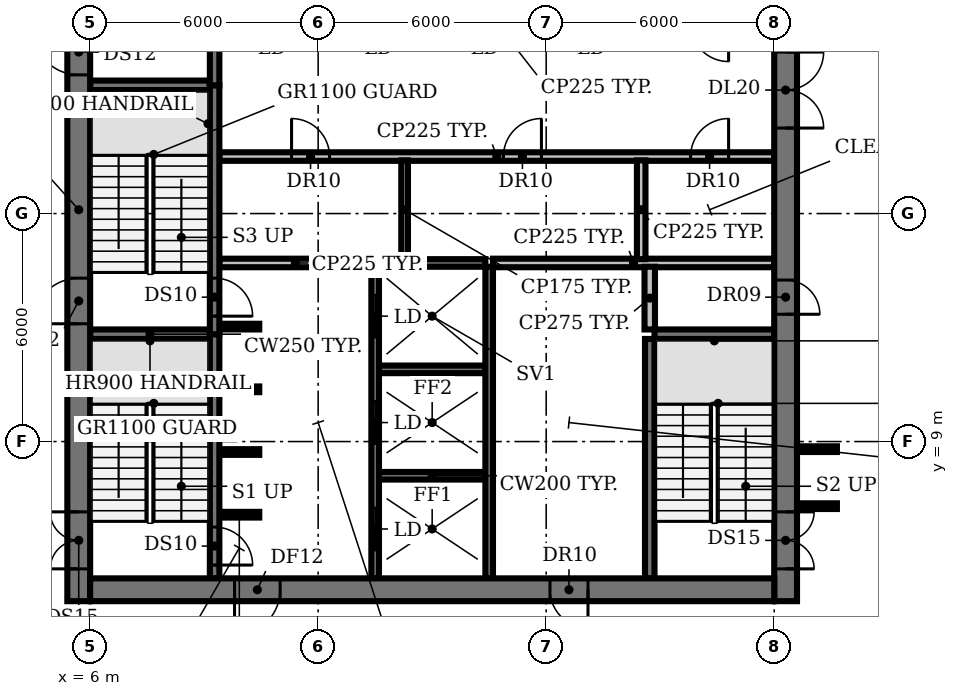
"""IFC4 building model, lengths in metres.
Left out: names, types, materials, properties, quantities, classifications, styles, units other than length and angle.
Written with IfcOpenShell. Run it as: python <this file> out.ifc"""

import sys

from ifc_helpers import new_model, si_unit, direction, frame, frame_2d, origin, place, context, subcontext, project, spatial, rectangle, extrude, element, fill, save


model = new_model("IFC4")
c1 = context("Model", 3, precision=1e-05, world=origin(), true_north=direction((0.0, 1.0)))
c2 = subcontext(c1, "Body", "Model", "MODEL_VIEW")
j1 = project(units=[si_unit("LENGTHUNIT", "METRE"), si_unit("PLANEANGLEUNIT", "RADIAN")], contexts=[c1])
p1 = place(None, origin())
s1 = spatial("IfcSite", under=j1, at=p1, CompositionType="ELEMENT")
p2 = place(p1, origin())
s2 = spatial("IfcBuilding", under=s1, at=p2, CompositionType="ELEMENT")
p3 = place(p2, frame((0.0, 0.0, 184.4)))
s3 = spatial("IfcBuildingStorey", under=s2, at=p3, CompositionType="ELEMENT", Elevation=184.4)
p4 = place(p3, frame((9.4, 7.075, 0.0), z_axis=(0.0, 0.0, 1.0), x_axis=(1.0, 0.0, 0.0)))
e1 = element("IfcWall", 1, at=p4, inside=s3, PredefinedType="SHEAR", context=c2, shape_type="SweptSolid", body=[
    extrude(rectangle(XDim=1.05, YDim=0.15, at=frame_2d((0.525, 0.0))), origin(), (0.0, 0.0, 1.0), 3.85),
])
p5 = place(p3, frame((13.6, 8.1, 0.0), z_axis=(0.0, 0.0, 1.0), x_axis=(1.0, 0.0, 0.0)))
e2 = element("IfcWall", 2, at=p5, inside=s3, PredefinedType="SHEAR", context=c2, shape_type="SweptSolid", body=[
    extrude(rectangle(XDim=2.8, YDim=0.2, at=frame_2d((1.4, 0.0))), origin(), (0.0, 0.0, 1.0), 3.85),
])
for number, where, z_axis, x_axis in (
    (3, (9.4, 8.725, 0.0), (0.0, 0.0, 1.0), (1.0, 0.0, 0.0)),
    (4, (9.4, 10.375, 0.0), (0.0, 0.0, 1.0), (1.0, 0.0, 0.0)),
):
    element("IfcWall", number, at=place(p3, frame(where, z_axis=z_axis, x_axis=x_axis)), inside=s3, PredefinedType="SHEAR", context=c2, shape_type="SweptSolid", body=[
        extrude(rectangle(XDim=1.05, YDim=0.15, at=frame_2d((0.525, 0.0))), origin(), (0.0, 0.0, 1.0), 3.85),
    ])
p6 = place(p3, frame((13.6, 10.9, 0.0), z_axis=(0.0, 0.0, 1.0), x_axis=(1.0, 0.0, 0.0)))
e5 = element("IfcWall", 5, at=p6, inside=s3, PredefinedType="SHEAR", context=c2, shape_type="SweptSolid", body=[
    extrude(rectangle(XDim=2.8, YDim=0.2, at=frame_2d((1.4, 0.0))), origin(), (0.0, 0.0, 1.0), 3.85),
])
for number, where, z_axis, x_axis in (
    (6, (6.0, 11.825, 0.0), (0.0, 0.0, 1.0), (1.0, 0.0, 0.0)),
    (7, (20.85, 11.825, 0.0), (0.0, 0.0, 1.0), (1.0, 0.0, 0.0)),
):
    element("IfcWall", number, at=place(p3, frame(where, z_axis=z_axis, x_axis=x_axis)), inside=s3, PredefinedType="SHEAR", context=c2, shape_type="SweptSolid", body=[
        extrude(rectangle(XDim=3.15, YDim=0.25, at=frame_2d((1.575, 0.0))), origin(), (0.0, 0.0, 1.0), 3.85),
    ])
p7 = place(p3, frame((9.4, 12.025, 0.0), z_axis=(0.0, 0.0, 1.0), x_axis=(1.0, 0.0, 0.0)))
e8 = element("IfcWall", 8, at=p7, inside=s3, PredefinedType="SHEAR", context=c2, shape_type="SweptSolid", body=[
    extrude(rectangle(XDim=1.05, YDim=0.15, at=frame_2d((0.525, 0.0))), origin(), (0.0, 0.0, 1.0), 3.85),
])
p8 = place(p3, frame((9.4, 13.7, 0.0), z_axis=(0.0, 0.0, 1.0), x_axis=(1.0, 0.0, 0.0)))
e9 = element("IfcWall", 9, at=p8, inside=s3, PredefinedType="PARTITIONING", context=c2, shape_type="SweptSolid", body=[
    extrude(rectangle(XDim=4.0, YDim=0.225, at=frame_2d((2.0, 0.0))), origin(), (0.0, 0.0, 1.0), 3.85),
])
p9 = place(p3, frame((13.6, 13.7, 0.0), z_axis=(0.0, 0.0, 1.0), x_axis=(1.0, 0.0, 0.0)))
e10 = element("IfcWall", 10, at=p9, inside=s3, PredefinedType="SHEAR", context=c2, shape_type="SweptSolid", body=[
    extrude(rectangle(XDim=2.8, YDim=0.2, at=frame_2d((1.4, 0.0))), origin(), (0.0, 0.0, 1.0), 3.85),
])
p10 = place(p3, frame((16.6, 13.7, 0.0), z_axis=(0.0, 0.0, 1.0), x_axis=(1.0, 0.0, 0.0)))
e11 = element("IfcWall", 11, at=p10, inside=s3, PredefinedType="PARTITIONING", context=c2, shape_type="SweptSolid", body=[
    extrude(rectangle(XDim=7.4, YDim=0.225, at=frame_2d((3.7, 0.0))), origin(), (0.0, 0.0, 1.0), 3.85),
])
p11 = place(p3, frame((9.4, 16.5, 0.0), z_axis=(0.0, 0.0, 1.0), x_axis=(1.0, 0.0, 0.0)))
e12 = element("IfcWall", 12, at=p11, inside=s3, PredefinedType="PARTITIONING", context=c2, shape_type="SweptSolid", body=[
    extrude(rectangle(XDim=14.6, YDim=0.225, at=frame_2d((7.3, 0.0))), origin(), (0.0, 0.0, 1.0), 3.85),
])
p12 = place(p11, frame((1.9, 0.0, 0.0)))
e13 = element("IfcOpeningElement", 13, at=p12, cuts=e12, PredefinedType="OPENING", context=c2, shape_type="SweptSolid", body=[
    extrude(rectangle(XDim=1.0, YDim=2.1, at=frame_2d((0.5, 1.05))), frame((0.0, 0.123, 0.0), z_axis=(0.0, -1.0, 0.0), x_axis=(1.0, 0.0, 0.0)), (0.0, 0.0, 1.0), 0.245),
])
p13 = place(p11, frame((7.475, 0.0, 0.0)))
e14 = element("IfcOpeningElement", 14, at=p13, cuts=e12, PredefinedType="OPENING", context=c2, shape_type="SweptSolid", body=[
    extrude(rectangle(XDim=1.0, YDim=2.1, at=frame_2d((0.5, 1.05))), frame((0.0, 0.123, 0.0), z_axis=(0.0, -1.0, 0.0), x_axis=(1.0, 0.0, 0.0)), (0.0, 0.0, 1.0), 0.245),
])
p14 = place(p11, frame((12.4, 0.0, 0.0)))
e15 = element("IfcOpeningElement", 15, at=p14, cuts=e12, PredefinedType="OPENING", context=c2, shape_type="SweptSolid", body=[
    extrude(rectangle(XDim=1.0, YDim=2.1, at=frame_2d((0.5, 1.05))), frame((0.0, 0.123, 0.0), z_axis=(0.0, -1.0, 0.0), x_axis=(1.0, 0.0, 0.0)), (0.0, 0.0, 1.0), 0.245),
])
p15 = place(p3, frame((6.0, 18.375, 0.0), z_axis=(0.0, 0.0, 1.0), x_axis=(1.0, 0.0, 0.0)))
e16 = element("IfcWall", 16, at=p15, inside=s3, PredefinedType="SHEAR", context=c2, shape_type="SweptSolid", body=[
    extrude(rectangle(XDim=3.15, YDim=0.25, at=frame_2d((1.575, 0.0))), origin(), (0.0, 0.0, 1.0), 3.85),
])
p16 = place(p3, frame((9.275, 11.825, 0.0), z_axis=(0.0, 0.0, 1.0), x_axis=(0.0, -1.0, 0.0)))
e17 = element("IfcWall", 17, at=p16, inside=s3, PredefinedType="SHEAR", context=c2, shape_type="SweptSolid", body=[
    extrude(rectangle(XDim=6.425, YDim=0.25, at=frame_2d((3.212, 0.0))), origin(), (0.0, 0.0, 1.0), 3.85),
])
p17 = place(p16, frame((5.075, 0.0, 0.0)))
e18 = element("IfcOpeningElement", 18, at=p17, cuts=e17, PredefinedType="OPENING", context=c2, shape_type="SweptSolid", body=[
    extrude(rectangle(XDim=1.0, YDim=2.1, at=frame_2d((0.5, 1.05))), frame((0.0, 0.135, 0.0), z_axis=(0.0, -1.0, 0.0), x_axis=(1.0, 0.0, 0.0)), (0.0, 0.0, 1.0), 0.27),
])
p18 = place(p3, frame((9.275, 18.375, 0.0), z_axis=(0.0, 0.0, 1.0), x_axis=(0.0, -1.0, 0.0)))
e19 = element("IfcWall", 19, at=p18, inside=s3, PredefinedType="SHEAR", context=c2, shape_type="SweptSolid", body=[
    extrude(rectangle(XDim=6.55, YDim=0.25, at=frame_2d((3.275, 0.0))), origin(), (0.0, 0.0, 1.0), 3.85),
])
p19 = place(p18, frame((5.075, 0.0, 0.0)))
e20 = element("IfcOpeningElement", 20, at=p19, cuts=e19, PredefinedType="OPENING", context=c2, shape_type="SweptSolid", body=[
    extrude(rectangle(XDim=1.0, YDim=2.1, at=frame_2d((0.5, 1.05))), frame((0.0, 0.135, 0.0), z_axis=(0.0, -1.0, 0.0), x_axis=(1.0, 0.0, 0.0)), (0.0, 0.0, 1.0), 0.27),
])
p20 = place(p3, frame((9.275, 18.375, 0.0), z_axis=(0.0, 0.0, 1.0), x_axis=(0.0, 1.0, 0.0)))
e21 = element("IfcWall", 21, at=p20, inside=s3, PredefinedType="SHEAR", context=c2, shape_type="SweptSolid", body=[
    extrude(rectangle(XDim=6.425, YDim=0.25, at=frame_2d((3.212, 0.0))), origin(), (0.0, 0.0, 1.0), 3.85),
])
p21 = place(p3, frame((13.5, 5.4, 0.0), z_axis=(0.0, 0.0, 1.0), x_axis=(0.0, 1.0, 0.0)))
e22 = element("IfcWall", 22, at=p21, inside=s3, PredefinedType="SHEAR", context=c2, shape_type="SweptSolid", body=[
    extrude(rectangle(XDim=8.2, YDim=0.2, at=frame_2d((4.1, 0.0))), origin(), (0.0, 0.0, 1.0), 3.85),
])
p22 = place(p21, frame((0.75, 0.0, 0.0)))
e23 = element("IfcOpeningElement", 23, at=p22, cuts=e22, PredefinedType="OPENING", context=c2, shape_type="SweptSolid", body=[
    extrude(rectangle(XDim=1.1, YDim=2.1, at=frame_2d((0.55, 1.05))), frame((0.0, 0.11, 0.0), z_axis=(0.0, -1.0, 0.0), x_axis=(1.0, 0.0, 0.0)), (0.0, 0.0, 1.0), 0.22),
])
p23 = place(p21, frame((3.55, 0.0, 0.0)))
e24 = element("IfcOpeningElement", 24, at=p23, cuts=e22, PredefinedType="OPENING", context=c2, shape_type="SweptSolid", body=[
    extrude(rectangle(XDim=1.1, YDim=2.1, at=frame_2d((0.55, 1.05))), frame((0.0, 0.11, 0.0), z_axis=(0.0, -1.0, 0.0), x_axis=(1.0, 0.0, 0.0)), (0.0, 0.0, 1.0), 0.22),
])
p24 = place(p21, frame((6.35, 0.0, 0.0)))
e25 = element("IfcOpeningElement", 25, at=p24, cuts=e22, PredefinedType="OPENING", context=c2, shape_type="SweptSolid", body=[
    extrude(rectangle(XDim=1.1, YDim=2.1, at=frame_2d((0.55, 1.05))), frame((0.0, 0.11, 0.0), z_axis=(0.0, -1.0, 0.0), x_axis=(1.0, 0.0, 0.0)), (0.0, 0.0, 1.0), 0.22),
])
p25 = place(p3, frame((14.275, 13.8, 0.0), z_axis=(0.0, 0.0, 1.0), x_axis=(0.0, 1.0, 0.0)))
e26 = element("IfcWall", 26, at=p25, inside=s3, PredefinedType="PARTITIONING", context=c2, shape_type="SweptSolid", body=[
    extrude(rectangle(XDim=2.6, YDim=0.175, at=frame_2d((1.3, 0.0))), origin(), (0.0, 0.0, 1.0), 3.85),
])
p26 = place(p3, frame((16.5, 5.4, 0.0), z_axis=(0.0, 0.0, 1.0), x_axis=(0.0, 1.0, 0.0)))
e27 = element("IfcWall", 27, at=p26, inside=s3, PredefinedType="SHEAR", context=c2, shape_type="SweptSolid", body=[
    extrude(rectangle(XDim=8.2, YDim=0.2, at=frame_2d((4.1, 0.0))), origin(), (0.0, 0.0, 1.0), 3.85),
])
p27 = place(p3, frame((20.5, 13.8, 0.0), z_axis=(0.0, 0.0, 1.0), x_axis=(0.0, 1.0, 0.0)))
e28 = element("IfcWall", 28, at=p27, inside=s3, PredefinedType="PARTITIONING", context=c2, shape_type="SweptSolid", body=[
    extrude(rectangle(XDim=2.6, YDim=0.225, at=frame_2d((1.3, 0.0))), origin(), (0.0, 0.0, 1.0), 3.85),
])
p28 = place(p3, frame((20.725, 5.4, 0.0), z_axis=(0.0, 0.0, 1.0), x_axis=(0.0, 1.0, 0.0)))
e29 = element("IfcWall", 29, at=p28, inside=s3, PredefinedType="SHEAR", context=c2, shape_type="SweptSolid", body=[
    extrude(rectangle(XDim=6.3, YDim=0.25, at=frame_2d((3.15, 0.0))), origin(), (0.0, 0.0, 1.0), 3.85),
])
p29 = place(p3, frame((20.725, 11.95, 0.0), z_axis=(0.0, 0.0, 1.0), x_axis=(0.0, 1.0, 0.0)))
e30 = element("IfcWall", 30, at=p29, inside=s3, PredefinedType="PARTITIONING", context=c2, shape_type="SweptSolid", body=[
    extrude(rectangle(XDim=1.65, YDim=0.275, at=frame_2d((0.825, 0.0))), origin(), (0.0, 0.0, 1.0), 3.85),
])
p30 = place(p3, frame((5.7, 4.8, 0.0), z_axis=(0.0, 0.0, 1.0), x_axis=(0.0, 1.0, 0.0)))
e31 = element("IfcWall", 31, at=p30, inside=s3, PredefinedType="SHEAR", context=c2, shape_type="SweptSolid", body=[
    extrude(rectangle(XDim=20.6, YDim=0.6, at=frame_2d((10.3, 0.0))), origin(), (0.0, 0.0, 1.0), 3.85),
])
p31 = place(p30, frame((0.85, 0.0, 0.0)))
e32 = element("IfcOpeningElement", 32, at=p31, cuts=e31, PredefinedType="OPENING", context=c2, shape_type="SweptSolid", body=[
    extrude(rectangle(XDim=1.5, YDim=2.1, at=frame_2d((0.75, 1.05))), frame((0.0, 0.31, 0.0), z_axis=(0.0, -1.0, 0.0), x_axis=(1.0, 0.0, 0.0)), (0.0, 0.0, 1.0), 0.62),
])
p32 = place(p30, frame((7.3, 0.0, 0.0)))
e33 = element("IfcOpeningElement", 33, at=p32, cuts=e31, PredefinedType="OPENING", context=c2, shape_type="SweptSolid", body=[
    extrude(rectangle(XDim=1.2, YDim=2.1, at=frame_2d((0.6, 1.05))), frame((0.0, 0.31, 0.0), z_axis=(0.0, -1.0, 0.0), x_axis=(1.0, 0.0, 0.0)), (0.0, 0.0, 1.0), 0.62),
])
p33 = place(p30, frame((13.85, 0.0, 0.0)))
e34 = element("IfcOpeningElement", 34, at=p33, cuts=e31, PredefinedType="OPENING", context=c2, shape_type="SweptSolid", body=[
    extrude(rectangle(XDim=1.2, YDim=2.1, at=frame_2d((0.6, 1.05))), frame((0.0, 0.31, 0.0), z_axis=(0.0, -1.0, 0.0), x_axis=(1.0, 0.0, 0.0)), (0.0, 0.0, 1.0), 0.62),
])
p34 = place(p3, frame((24.3, 25.555, 0.0), z_axis=(0.0, 0.0, 1.0), x_axis=(0.0, -1.0, 0.0)))
e35 = element("IfcWall", 35, at=p34, inside=s3, PredefinedType="SHEAR", context=c2, shape_type="SweptSolid", body=[
    extrude(rectangle(XDim=20.755, YDim=0.6, at=frame_2d((10.377, 0.0))), origin(), (0.0, 0.0, 1.0), 3.85),
])
p35 = place(p34, frame((18.405, 0.0, 0.0)))
e36 = element("IfcOpeningElement", 36, at=p35, cuts=e35, PredefinedType="OPENING", context=c2, shape_type="SweptSolid", body=[
    extrude(rectangle(XDim=1.5, YDim=2.1, at=frame_2d((0.75, 1.05))), frame((0.0, 0.31, 0.0), z_axis=(0.0, -1.0, 0.0), x_axis=(1.0, 0.0, 0.0)), (0.0, 0.0, 1.0), 0.62),
])
p36 = place(p34, frame((12.305, 0.0, 0.0)))
e37 = element("IfcOpeningElement", 37, at=p36, cuts=e35, PredefinedType="OPENING", context=c2, shape_type="SweptSolid", body=[
    extrude(rectangle(XDim=0.9, YDim=2.1, at=frame_2d((0.45, 1.05))), frame((0.0, 0.31, 0.0), z_axis=(0.0, -1.0, 0.0), x_axis=(1.0, 0.0, 0.0)), (0.0, 0.0, 1.0), 0.62),
])
p37 = place(p34, frame((6.305, 0.0, 0.0)))
e38 = element("IfcOpeningElement", 38, at=p37, cuts=e35, PredefinedType="OPENING", context=c2, shape_type="SweptSolid", body=[
    extrude(rectangle(XDim=2.0, YDim=2.1, at=frame_2d((1.0, 1.05))), frame((0.0, 0.31, 0.0), z_axis=(0.0, -1.0, 0.0), x_axis=(1.0, 0.0, 0.0)), (0.0, 0.0, 1.0), 0.62),
])
p38 = place(p3, frame((24.0, 5.1, 0.0), z_axis=(0.0, 0.0, 1.0), x_axis=(-1.0, 0.0, 0.0)))
e39 = element("IfcWall", 39, at=p38, inside=s3, PredefinedType="SHEAR", context=c2, shape_type="SweptSolid", body=[
    extrude(rectangle(XDim=18.0, YDim=0.6, at=frame_2d((9.0, 0.0))), origin(), (0.0, 0.0, 1.0), 3.85),
])
p39 = place(p38, frame((13.0, 0.0, 0.0)))
e40 = element("IfcOpeningElement", 40, at=p39, cuts=e39, PredefinedType="OPENING", context=c2, shape_type="SweptSolid", body=[
    extrude(rectangle(XDim=1.2, YDim=2.1, at=frame_2d((0.6, 1.05))), frame((0.0, 0.31, 0.0), z_axis=(0.0, -1.0, 0.0), x_axis=(1.0, 0.0, 0.0)), (0.0, 0.0, 1.0), 0.62),
])
p40 = place(p38, frame((4.9, 0.0, 0.0)))
e41 = element("IfcOpeningElement", 41, at=p40, cuts=e39, PredefinedType="OPENING", context=c2, shape_type="SweptSolid", body=[
    extrude(rectangle(XDim=1.0, YDim=2.1, at=frame_2d((0.5, 1.05))), frame((0.0, 0.31, 0.0), z_axis=(0.0, -1.0, 0.0), x_axis=(1.0, 0.0, 0.0)), (0.0, 0.0, 1.0), 0.62),
])
for number, where, z_axis, x_axis in (
    (42, (24.6, 7.3, 0.0), (0.0, 0.0, 1.0), (1.0, 0.0, 0.0)),
    (43, (24.6, 8.8, 0.0), (0.0, 0.0, 1.0), (1.0, 0.0, 0.0)),
):
    element("IfcWall", number, at=place(p3, frame(where, z_axis=z_axis, x_axis=x_axis)), inside=s3, PredefinedType="PARTITIONING", context=c2, shape_type="SweptSolid", body=[
        extrude(rectangle(XDim=1.05, YDim=0.15, at=frame_2d((0.525, 0.0))), origin(), (0.0, 0.0, 1.0), 2.88),
    ])
p41 = place(p12, origin())
e44 = element("IfcDoor", 44, at=p41, inside=s3, OperationType="SINGLE_SWING_LEFT", PredefinedType="DOOR", context=c2, shape_type="SweptSolid", body=[
    extrude(rectangle(XDim=1.0, YDim=2.1, at=frame_2d((0.5, 1.05))), frame((0.0, 0.025, 0.0), z_axis=(0.0, -1.0, 0.0), x_axis=(1.0, 0.0, 0.0)), (0.0, 0.0, 1.0), 0.05),
])
fill(e13, e44)
p42 = place(p13, origin())
e45 = element("IfcDoor", 45, at=p42, inside=s3, OperationType="SINGLE_SWING_RIGHT", PredefinedType="DOOR", context=c2, shape_type="SweptSolid", body=[
    extrude(rectangle(XDim=1.0, YDim=2.1, at=frame_2d((0.5, 1.05))), frame((0.0, 0.025, 0.0), z_axis=(0.0, -1.0, 0.0), x_axis=(1.0, 0.0, 0.0)), (0.0, 0.0, 1.0), 0.05),
])
fill(e14, e45)
p43 = place(p14, origin())
e46 = element("IfcDoor", 46, at=p43, inside=s3, OperationType="SINGLE_SWING_RIGHT", PredefinedType="DOOR", context=c2, shape_type="SweptSolid", body=[
    extrude(rectangle(XDim=1.0, YDim=2.1, at=frame_2d((0.5, 1.05))), frame((0.0, 0.025, 0.0), z_axis=(0.0, -1.0, 0.0), x_axis=(1.0, 0.0, 0.0)), (0.0, 0.0, 1.0), 0.05),
])
fill(e15, e46)
p44 = place(p17, origin())
e47 = element("IfcDoor", 47, at=p44, inside=s3, OperationType="SINGLE_SWING_RIGHT", PredefinedType="DOOR", context=c2, shape_type="SweptSolid", body=[
    extrude(rectangle(XDim=1.0, YDim=2.1, at=frame_2d((0.5, 1.05))), frame((0.0, 0.025, 0.0), z_axis=(0.0, -1.0, 0.0), x_axis=(1.0, 0.0, 0.0)), (0.0, 0.0, 1.0), 0.05),
])
fill(e18, e47)
p45 = place(p19, origin())
e48 = element("IfcDoor", 48, at=p45, inside=s3, OperationType="SINGLE_SWING_RIGHT", PredefinedType="DOOR", context=c2, shape_type="SweptSolid", body=[
    extrude(rectangle(XDim=1.0, YDim=2.1, at=frame_2d((0.5, 1.05))), frame((0.0, 0.025, 0.0), z_axis=(0.0, -1.0, 0.0), x_axis=(1.0, 0.0, 0.0)), (0.0, 0.0, 1.0), 0.05),
])
fill(e20, e48)
p46 = place(p22, origin())
e49 = element("IfcDoor", 49, at=p46, inside=s3, OperationType="DOUBLE_DOOR_SLIDING", PredefinedType="DOOR", context=c2, shape_type="SweptSolid", body=[
    extrude(rectangle(XDim=1.1, YDim=2.1, at=frame_2d((0.55, 1.05))), frame((0.0, 0.025, 0.0), z_axis=(0.0, -1.0, 0.0), x_axis=(1.0, 0.0, 0.0)), (0.0, 0.0, 1.0), 0.05),
])
fill(e23, e49)
p47 = place(p23, origin())
e50 = element("IfcDoor", 50, at=p47, inside=s3, OperationType="DOUBLE_DOOR_SLIDING", PredefinedType="DOOR", context=c2, shape_type="SweptSolid", body=[
    extrude(rectangle(XDim=1.1, YDim=2.1, at=frame_2d((0.55, 1.05))), frame((0.0, 0.025, 0.0), z_axis=(0.0, -1.0, 0.0), x_axis=(1.0, 0.0, 0.0)), (0.0, 0.0, 1.0), 0.05),
])
fill(e24, e50)
p48 = place(p24, origin())
e51 = element("IfcDoor", 51, at=p48, inside=s3, OperationType="DOUBLE_DOOR_SLIDING", PredefinedType="DOOR", context=c2, shape_type="SweptSolid", body=[
    extrude(rectangle(XDim=1.1, YDim=2.1, at=frame_2d((0.55, 1.05))), frame((0.0, 0.025, 0.0), z_axis=(0.0, -1.0, 0.0), x_axis=(1.0, 0.0, 0.0)), (0.0, 0.0, 1.0), 0.05),
])
fill(e25, e51)
p49 = place(p31, origin())
e52 = element("IfcDoor", 52, at=p49, inside=s3, OperationType="DOUBLE_DOOR_SINGLE_SWING", PredefinedType="DOOR", context=c2, shape_type="SweptSolid", body=[
    extrude(rectangle(XDim=1.5, YDim=2.1, at=frame_2d((0.75, 1.05))), frame((0.0, 0.025, 0.0), z_axis=(0.0, -1.0, 0.0), x_axis=(1.0, 0.0, 0.0)), (0.0, 0.0, 1.0), 0.05),
])
fill(e32, e52)
p50 = place(p32, origin())
e53 = element("IfcDoor", 53, at=p50, inside=s3, OperationType="SINGLE_SWING_LEFT", PredefinedType="DOOR", context=c2, shape_type="SweptSolid", body=[
    extrude(rectangle(XDim=1.2, YDim=2.1, at=frame_2d((0.6, 1.05))), frame((0.0, 0.025, 0.0), z_axis=(0.0, -1.0, 0.0), x_axis=(1.0, 0.0, 0.0)), (0.0, 0.0, 1.0), 0.05),
])
fill(e33, e53)
p51 = place(p33, origin())
e54 = element("IfcDoor", 54, at=p51, inside=s3, OperationType="SINGLE_SWING_RIGHT", PredefinedType="DOOR", context=c2, shape_type="SweptSolid", body=[
    extrude(rectangle(XDim=1.2, YDim=2.1, at=frame_2d((0.6, 1.05))), frame((0.0, 0.025, 0.0), z_axis=(0.0, -1.0, 0.0), x_axis=(1.0, 0.0, 0.0)), (0.0, 0.0, 1.0), 0.05),
])
fill(e34, e54)
p52 = place(p35, origin())
e55 = element("IfcDoor", 55, at=p52, inside=s3, OperationType="DOUBLE_DOOR_SINGLE_SWING", PredefinedType="DOOR", context=c2, shape_type="SweptSolid", body=[
    extrude(rectangle(XDim=1.5, YDim=2.1, at=frame_2d((0.75, 1.05))), frame((0.0, 0.025, 0.0), z_axis=(0.0, -1.0, 0.0), x_axis=(1.0, 0.0, 0.0)), (0.0, 0.0, 1.0), 0.05),
])
fill(e36, e55)
p53 = place(p36, origin())
e56 = element("IfcDoor", 56, at=p53, inside=s3, OperationType="SINGLE_SWING_RIGHT", PredefinedType="DOOR", context=c2, shape_type="SweptSolid", body=[
    extrude(rectangle(XDim=0.9, YDim=2.1, at=frame_2d((0.45, 1.05))), frame((0.0, -0.24, 0.0), z_axis=(0.0, -1.0, 0.0), x_axis=(1.0, 0.0, 0.0)), (0.0, 0.0, 1.0), 0.05),
])
fill(e37, e56)
p54 = place(p37, origin())
e57 = element("IfcDoor", 57, at=p54, inside=s3, OperationType="DOUBLE_DOOR_SINGLE_SWING", PredefinedType="DOOR", context=c2, shape_type="SweptSolid", body=[
    extrude(rectangle(XDim=2.0, YDim=2.1, at=frame_2d((1.0, 1.05))), frame((0.0, 0.025, 0.0), z_axis=(0.0, -1.0, 0.0), x_axis=(1.0, 0.0, 0.0)), (0.0, 0.0, 1.0), 0.05),
])
fill(e38, e57)
p55 = place(p39, origin())
e58 = element("IfcDoor", 58, at=p55, inside=s3, OperationType="SINGLE_SWING_RIGHT", PredefinedType="DOOR", context=c2, shape_type="SweptSolid", body=[
    extrude(rectangle(XDim=1.2, YDim=2.1, at=frame_2d((0.6, 1.05))), frame((0.0, 0.025, 0.0), z_axis=(0.0, -1.0, 0.0), x_axis=(1.0, 0.0, 0.0)), (0.0, 0.0, 1.0), 0.05),
])
fill(e40, e58)
p56 = place(p40, origin())
e59 = element("IfcDoor", 59, at=p56, inside=s3, OperationType="SINGLE_SWING_LEFT", PredefinedType="DOOR", context=c2, shape_type="SweptSolid", body=[
    extrude(rectangle(XDim=1.0, YDim=2.1, at=frame_2d((0.5, 1.05))), frame((0.0, -0.24, 0.0), z_axis=(0.0, -1.0, 0.0), x_axis=(1.0, 0.0, 0.0)), (0.0, 0.0, 1.0), 0.05),
])
fill(e41, e59)
save(model, sys.argv[1])
